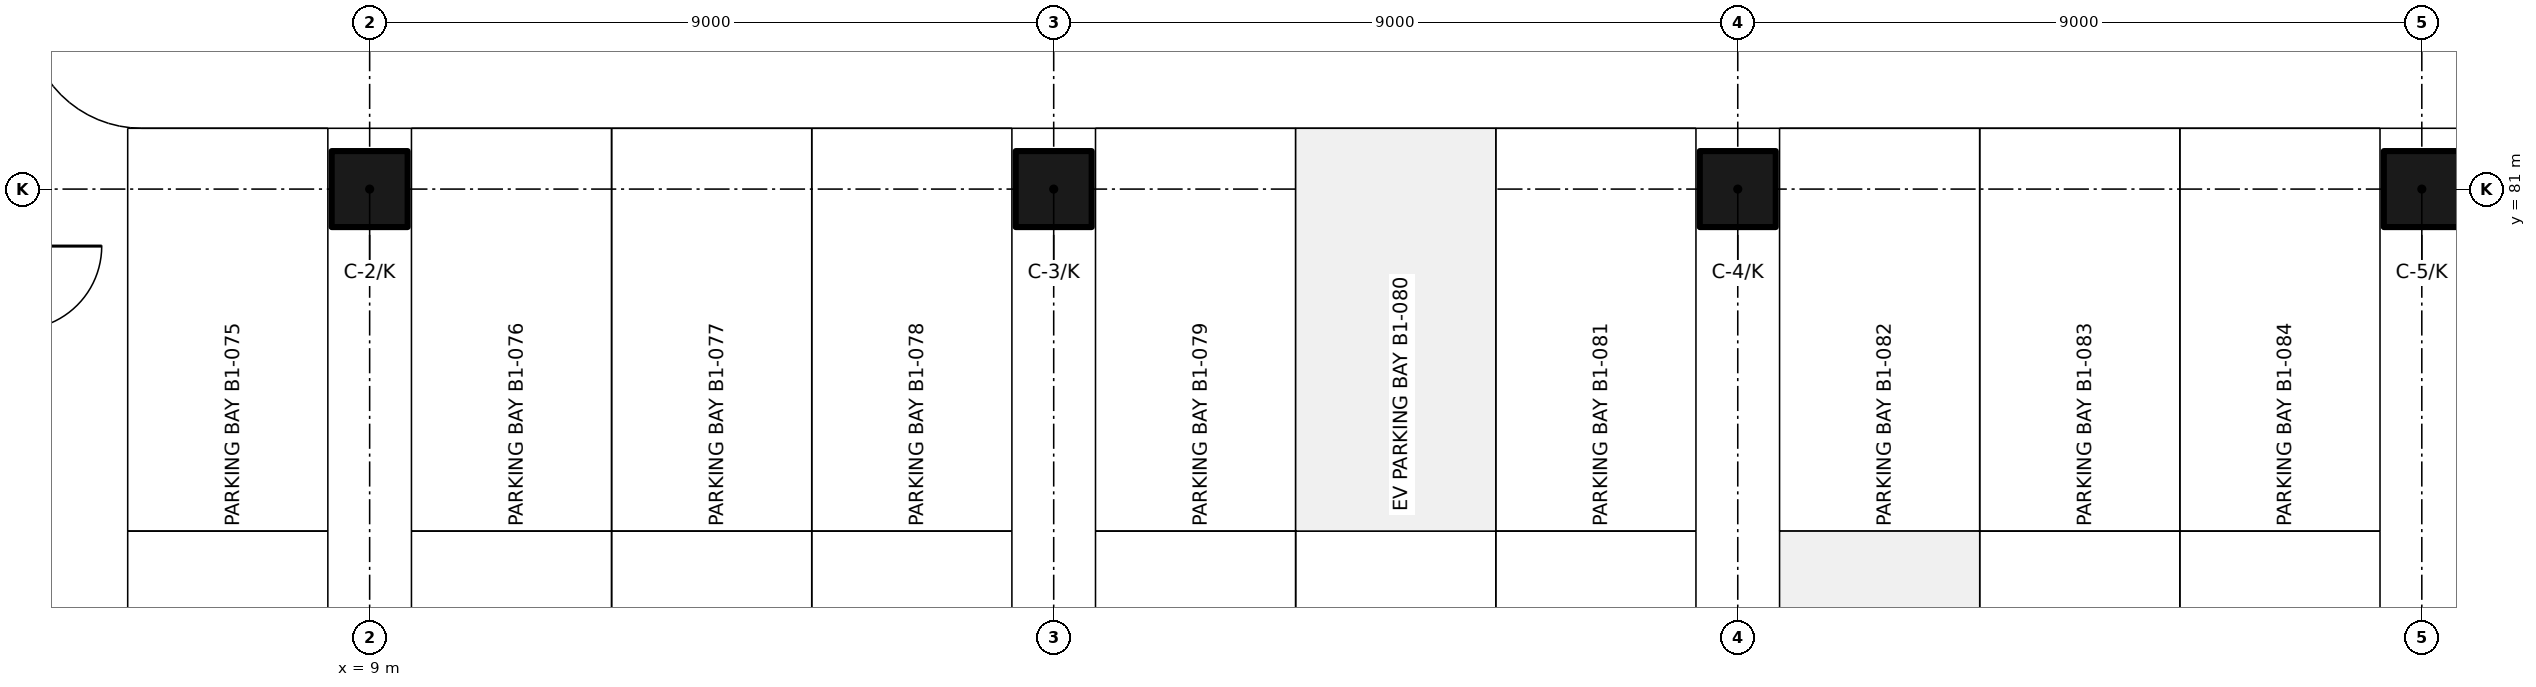
"""IFC4 building model, lengths in metres.
Left out: names, types, materials, properties, quantities, classifications, styles, units other than length and angle.
Written with IfcOpenShell. Run it as: python <this file> out.ifc"""

import sys

from ifc_helpers import new_model, si_unit, direction, frame, origin, origin_2d, place, context, subcontext, project, spatial, rectangle, extrude, element, save


model = new_model("IFC4")
c1 = context("Model", 3, precision=1e-05, world=origin(), true_north=direction((0.0, 1.0)))
c2 = subcontext(c1, "Body", "Model", "MODEL_VIEW")
j1 = project(units=[si_unit("LENGTHUNIT", "METRE"), si_unit("PLANEANGLEUNIT", "RADIAN")], contexts=[c1])
p1 = place(None, origin())
s1 = spatial("IfcSite", under=j1, at=p1, CompositionType="ELEMENT")
p2 = place(p1, origin())
s2 = spatial("IfcBuilding", under=s1, at=p2, CompositionType="ELEMENT")
p3 = place(p2, frame((0.0, 0.0, -5.1)))
s3 = spatial("IfcBuildingStorey", under=s2, at=p3, CompositionType="ELEMENT", Elevation=-5.1)
for number, where, z_axis, x_axis in (
    (1, (9.0, 81.0, 0.0), (0.0, 0.0, 1.0), (1.0, 0.0, 0.0)),
    (2, (18.0, 81.0, 0.0), (0.0, 0.0, 1.0), (1.0, 0.0, 0.0)),
    (3, (27.0, 81.0, 0.0), (0.0, 0.0, 1.0), (1.0, 0.0, 0.0)),
    (4, (36.0, 81.0, 0.0), (0.0, 0.0, 1.0), (1.0, 0.0, 0.0)),
):
    element("IfcColumn", number, at=place(p3, frame(where, z_axis=z_axis, x_axis=x_axis)), inside=s3, PredefinedType="COLUMN", context=c2, shape_type="SweptSolid", body=[
        extrude(rectangle(XDim=1.0, YDim=1.0, at=origin_2d()), origin(), (0.0, 0.0, 1.0), 5.1),
    ])
save(model, sys.argv[1])
